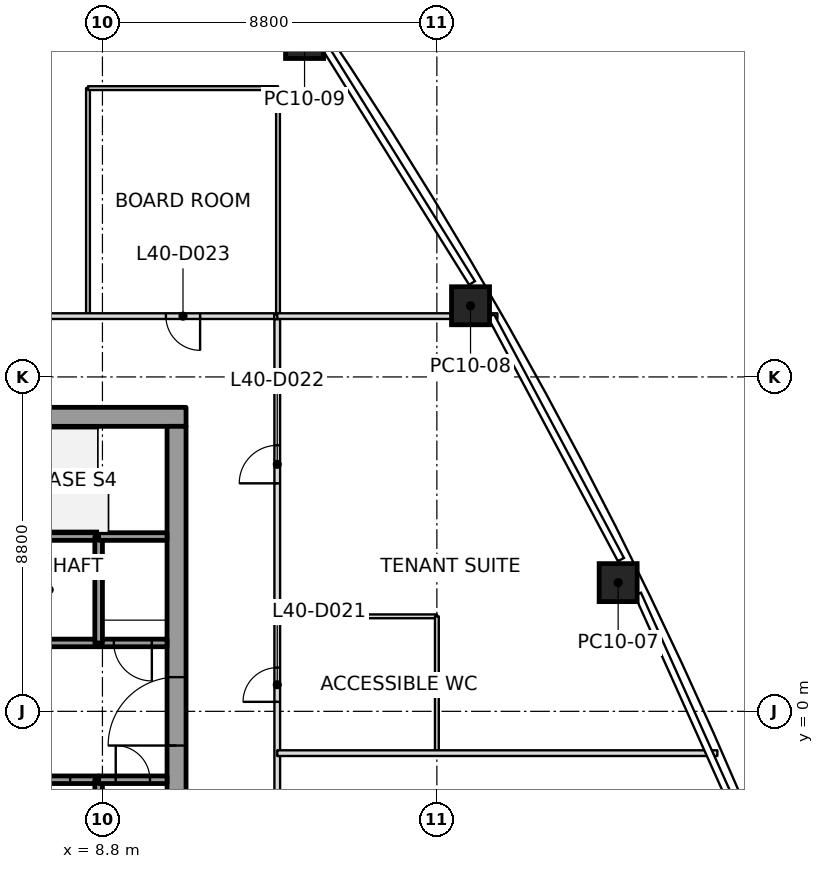
"""IFC4 building model, lengths in metres.
Left out: names, types, materials, properties, quantities, classifications, styles, units other than length and angle.
Written with IfcOpenShell. Run it as: python <this file> out.ifc"""

import sys

from ifc_helpers import new_model, si_unit, direction, frame, frame_2d, origin, origin_2d, place, context, subcontext, project, spatial, rectangle, extrude, element, fill, save


model = new_model("IFC4")
c1 = context("Model", 3, precision=1e-05, world=origin(), true_north=direction((0.0, 1.0)))
c2 = subcontext(c1, "Body", "Model", "MODEL_VIEW")
j1 = project(units=[si_unit("LENGTHUNIT", "METRE"), si_unit("PLANEANGLEUNIT", "RADIAN")], contexts=[c1])
p1 = place(None, origin())
s1 = spatial("IfcSite", under=j1, at=p1, CompositionType="ELEMENT")
p2 = place(p1, origin())
s2 = spatial("IfcBuilding", under=s1, at=p2, CompositionType="ELEMENT")
p3 = place(p2, frame((0.0, 0.0, 181.8)))
s3 = spatial("IfcBuildingStorey", under=s2, at=p3, CompositionType="ELEMENT", Elevation=181.8)
p4 = place(p3, frame((22.37, 3.387, 0.0), z_axis=(-0.014097691364, 0.002013955909, 0.999898594398), x_axis=(-0.440318544462, 0.897805834391, -0.008016429218)))
e1 = element("IfcColumn", 1, at=p4, inside=s3, PredefinedType="COLUMN", context=c2, shape_type="SweptSolid", body=[
    extrude(rectangle(XDim=1.0, YDim=1.0, at=origin_2d()), origin(), (0.0, 0.0, 1.0), 4.0),
])
p5 = place(p3, frame((18.486, 10.673, 0.0), z_axis=(-0.009887049298, -0.00573692984, 0.999934664812), x_axis=(-0.499975560967, 0.866039512843, 2.5126546e-05)))
e2 = element("IfcColumn", 2, at=p5, inside=s3, PredefinedType="COLUMN", context=c2, shape_type="SweptSolid", body=[
    extrude(rectangle(XDim=1.0, YDim=1.0, at=origin_2d()), origin(), (0.0, 0.0, 1.0), 4.0),
])
p6 = place(p3, frame((14.118, 17.68, 0.0), z_axis=(-0.005248490815, -0.013243284963, 0.999898529226), x_axis=(-0.55734623632, 0.83024095087, 0.00807070984)))
e3 = element("IfcColumn", 3, at=p6, inside=s3, PredefinedType="COLUMN", context=c2, shape_type="SweptSolid", body=[
    extrude(rectangle(XDim=1.0, YDim=1.0, at=origin_2d()), origin(), (0.0, 0.0, 1.0), 4.0),
])
p7 = place(p3, frame((-11.0, 7.75, 0.0), z_axis=(0.0, 0.0, 1.0), x_axis=(1.0, 0.0, 0.0)))
e4 = element("IfcWall", 4, at=p7, inside=s3, PredefinedType="SHEAR", context=c2, shape_type="SweptSolid", body=[
    extrude(rectangle(XDim=22.0, YDim=0.5, at=frame_2d((11.0, 0.0))), origin(), (0.0, 0.0, 1.0), 4.0),
])
p8 = place(p7, frame((10.45, 0.0, 0.0)))
e5 = element("IfcOpeningElement", 5, at=p8, cuts=e4, PredefinedType="OPENING", context=c2, shape_type="SweptSolid", body=[
    extrude(rectangle(XDim=1.1, YDim=2.1, at=frame_2d((0.55, 1.05))), frame((0.0, 0.25, 0.0), z_axis=(0.0, -1.0, 0.0), x_axis=(1.0, 0.0, 0.0)), (0.0, 0.0, 1.0), 0.5),
])
p9 = place(p3, frame((10.75, -7.5, 0.0), z_axis=(0.0, 0.0, 1.0), x_axis=(0.0, 1.0, 0.0)))
e6 = element("IfcWall", 6, at=p9, inside=s3, PredefinedType="SHEAR", context=c2, shape_type="SweptSolid", body=[
    extrude(rectangle(XDim=15.0, YDim=0.5, at=frame_2d((7.5, 0.0))), origin(), (0.0, 0.0, 1.0), 4.0),
])
p10 = place(p9, frame((6.6, 0.0, 0.0)))
e7 = element("IfcOpeningElement", 7, at=p10, cuts=e6, PredefinedType="OPENING", context=c2, shape_type="SweptSolid", body=[
    extrude(rectangle(XDim=1.8, YDim=2.1, at=frame_2d((0.9, 1.05))), frame((0.0, 0.25, 0.0), z_axis=(0.0, -1.0, 0.0), x_axis=(1.0, 0.0, 0.0)), (0.0, 0.0, 1.0), 0.5),
])
p11 = place(p3, frame((6.1, -1.8, 0.0), z_axis=(0.0, 0.0, 1.0), x_axis=(1.0, 0.0, 0.0)))
e8 = element("IfcWall", 8, at=p11, inside=s3, PredefinedType="SOLIDWALL", context=c2, shape_type="SweptSolid", body=[
    extrude(rectangle(XDim=2.6, YDim=0.2, at=frame_2d((1.3, 0.0))), origin(), (0.0, 0.0, 1.0), 3.85),
])
p12 = place(p11, frame((0.75, 0.0, 0.0)))
e9 = element("IfcOpeningElement", 9, at=p12, cuts=e8, PredefinedType="OPENING", context=c2, shape_type="SweptSolid", body=[
    extrude(rectangle(XDim=1.1, YDim=2.1, at=frame_2d((0.55, 1.05))), frame((0.0, 0.1, 0.0), z_axis=(0.0, -1.0, 0.0), x_axis=(1.0, 0.0, 0.0)), (0.0, 0.0, 1.0), 0.2),
])
for number, where, z_axis, x_axis in (
    (10, (8.7, 1.8, 0.0), (0.0, 0.0, 1.0), (-1.0, 0.0, 0.0)),
    (11, (8.7, 4.6, 0.0), (0.0, 0.0, 1.0), (-1.0, 0.0, 0.0)),
):
    element("IfcWall", number, at=place(p3, frame(where, z_axis=z_axis, x_axis=x_axis)), inside=s3, PredefinedType="SOLIDWALL", context=c2, shape_type="SweptSolid", body=[
        extrude(rectangle(XDim=2.6, YDim=0.2, at=frame_2d((1.3, 0.0))), origin(), (0.0, 0.0, 1.0), 3.85),
    ])
p13 = place(p3, frame((8.7, -1.8, 0.0), z_axis=(0.0, 0.0, 1.0), x_axis=(0.0, -1.0, 0.0)))
e12 = element("IfcWall", 12, at=p13, inside=s3, PredefinedType="SOLIDWALL", context=c2, shape_type="SweptSolid", body=[
    extrude(rectangle(XDim=2.8, YDim=0.2, at=frame_2d((1.4, 0.0))), origin(), (0.0, 0.0, 1.0), 3.85),
])
p14 = place(p3, frame((8.7, -1.8, 0.0), z_axis=(0.0, 0.0, 1.0), x_axis=(1.0, 0.0, 0.0)))
e13 = element("IfcWall", 13, at=p14, inside=s3, PredefinedType="SOLIDWALL", context=c2, shape_type="SweptSolid", body=[
    extrude(rectangle(XDim=1.8, YDim=0.2, at=frame_2d((0.9, 0.0))), origin(), (0.0, 0.0, 1.0), 3.85),
])
p15 = place(p14, frame((0.45, 0.0, 0.0)))
e14 = element("IfcOpeningElement", 14, at=p15, cuts=e13, PredefinedType="OPENING", context=c2, shape_type="SweptSolid", body=[
    extrude(rectangle(XDim=0.9, YDim=2.1, at=frame_2d((0.45, 1.05))), frame((0.0, 0.1, 0.0), z_axis=(0.0, -1.0, 0.0), x_axis=(1.0, 0.0, 0.0)), (0.0, 0.0, 1.0), 0.2),
])
p16 = place(p3, frame((10.5, 1.8, 0.0), z_axis=(0.0, 0.0, 1.0), x_axis=(-1.0, 0.0, 0.0)))
e15 = element("IfcWall", 15, at=p16, inside=s3, PredefinedType="SOLIDWALL", context=c2, shape_type="SweptSolid", body=[
    extrude(rectangle(XDim=1.8, YDim=0.2, at=frame_2d((0.9, 0.0))), origin(), (0.0, 0.0, 1.0), 3.85),
])
p17 = place(p16, frame((0.4, 0.0, 0.0)))
e16 = element("IfcOpeningElement", 16, at=p17, cuts=e15, PredefinedType="OPENING", context=c2, shape_type="SweptSolid", body=[
    extrude(rectangle(XDim=1.0, YDim=2.1, at=frame_2d((0.5, 1.05))), frame((0.0, 0.1, 0.0), z_axis=(0.0, -1.0, 0.0), x_axis=(1.0, 0.0, 0.0)), (0.0, 0.0, 1.0), 0.2),
])
p18 = place(p3, frame((8.7, 4.6, 0.0), z_axis=(0.0, 0.0, 1.0), x_axis=(0.0, -1.0, 0.0)))
e17 = element("IfcWall", 17, at=p18, inside=s3, PredefinedType="SOLIDWALL", context=c2, shape_type="SweptSolid", body=[
    extrude(rectangle(XDim=2.8, YDim=0.2, at=frame_2d((1.4, 0.0))), origin(), (0.0, 0.0, 1.0), 3.85),
])
p19 = place(p3, frame((10.5, 4.6, 0.0), z_axis=(0.0, 0.0, 1.0), x_axis=(-1.0, 0.0, 0.0)))
e18 = element("IfcWall", 18, at=p19, inside=s3, PredefinedType="SOLIDWALL", context=c2, shape_type="SweptSolid", body=[
    extrude(rectangle(XDim=1.8, YDim=0.2, at=frame_2d((0.9, 0.0))), origin(), (0.0, 0.0, 1.0), 3.85),
])
p20 = place(p3, frame((24.98, -1.1, 0.0), z_axis=(0.0, 0.0, 1.0), x_axis=(-1.0, 0.0, 0.0)))
e19 = element("IfcWall", 19, at=p20, inside=s3, PredefinedType="PARTITIONING", context=c2, shape_type="SweptSolid", body=[
    extrude(rectangle(XDim=11.58, YDim=0.15, at=frame_2d((5.79, 0.0))), origin(), (0.0, 0.0, 1.0), 3.234),
])
p21 = place(p3, frame((13.4, 10.4, 0.0), z_axis=(0.0, 0.0, 1.0), x_axis=(1.0, 0.0, 0.0)))
e20 = element("IfcWall", 20, at=p21, inside=s3, PredefinedType="PARTITIONING", context=c2, shape_type="SweptSolid", body=[
    extrude(rectangle(XDim=5.793, YDim=0.15, at=frame_2d((2.896, 0.0))), origin(), (0.0, 0.0, 1.0), 3.45),
])
p22 = place(p3, frame((13.32, 10.4, 0.0), z_axis=(0.0, 0.0, 1.0), x_axis=(-1.0, 0.0, 0.0)))
e21 = element("IfcWall", 21, at=p22, inside=s3, PredefinedType="PARTITIONING", context=c2, shape_type="SweptSolid", body=[
    extrude(rectangle(XDim=26.64, YDim=0.15, at=frame_2d((13.32, 0.0))), origin(), (0.0, 0.0, 1.0), 3.166),
])
p23 = place(p22, frame((1.95, 0.0, 0.0)))
e22 = element("IfcOpeningElement", 22, at=p23, cuts=e21, PredefinedType="OPENING", context=c2, shape_type="SweptSolid", body=[
    extrude(rectangle(XDim=0.9, YDim=2.1, at=frame_2d((0.45, 1.05))), frame((0.0, 0.075, 0.0), z_axis=(0.0, -1.0, 0.0), x_axis=(1.0, 0.0, 0.0)), (0.0, 0.0, 1.0), 0.15),
])
p24 = place(p22, frame((9.61, 0.0, 0.0)))
e23 = element("IfcOpeningElement", 23, at=p24, cuts=e21, PredefinedType="OPENING", context=c2, shape_type="SweptSolid", body=[
    extrude(rectangle(XDim=1.0, YDim=2.1, at=frame_2d((0.5, 1.05))), frame((0.0, 0.075, 0.0), z_axis=(0.0, -1.0, 0.0), x_axis=(1.0, 0.0, 0.0)), (0.0, 0.0, 1.0), 0.15),
])
p25 = place(p22, frame((16.87, 0.0, 0.0)))
e24 = element("IfcOpeningElement", 24, at=p25, cuts=e21, PredefinedType="OPENING", context=c2, shape_type="SweptSolid", body=[
    extrude(rectangle(XDim=0.9, YDim=2.1, at=frame_2d((0.45, 1.05))), frame((0.0, 0.075, 0.0), z_axis=(0.0, -1.0, 0.0), x_axis=(1.0, 0.0, 0.0)), (0.0, 0.0, 1.0), 0.15),
])
p26 = place(p22, frame((22.63, 0.0, 0.0)))
e25 = element("IfcOpeningElement", 25, at=p26, cuts=e21, PredefinedType="OPENING", context=c2, shape_type="SweptSolid", body=[
    extrude(rectangle(XDim=1.0, YDim=2.1, at=frame_2d((0.5, 1.05))), frame((0.0, 0.075, 0.0), z_axis=(0.0, -1.0, 0.0), x_axis=(1.0, 0.0, 0.0)), (0.0, 0.0, 1.0), 0.15),
])
p27 = place(p3, frame((13.4, -10.32, 0.0), z_axis=(0.0, 0.0, 1.0), x_axis=(0.0, 1.0, 0.0)))
e26 = element("IfcWall", 26, at=p27, inside=s3, PredefinedType="PARTITIONING", context=c2, shape_type="SweptSolid", body=[
    extrude(rectangle(XDim=20.64, YDim=0.15, at=frame_2d((10.32, 0.0))), origin(), (0.0, 0.0, 1.0), 3.166),
])
p28 = place(p27, frame((10.57, 0.0, 0.0)))
e27 = element("IfcOpeningElement", 27, at=p28, cuts=e26, PredefinedType="OPENING", context=c2, shape_type="SweptSolid", body=[
    extrude(rectangle(XDim=0.9, YDim=2.1, at=frame_2d((0.45, 1.05))), frame((0.0, 0.075, 0.0), z_axis=(0.0, -1.0, 0.0), x_axis=(1.0, 0.0, 0.0)), (0.0, 0.0, 1.0), 0.15),
])
p29 = place(p27, frame((16.32, 0.0, 0.0)))
e28 = element("IfcOpeningElement", 28, at=p29, cuts=e26, PredefinedType="OPENING", context=c2, shape_type="SweptSolid", body=[
    extrude(rectangle(XDim=1.0, YDim=2.1, at=frame_2d((0.5, 1.05))), frame((0.0, 0.075, 0.0), z_axis=(0.0, -1.0, 0.0), x_axis=(1.0, 0.0, 0.0)), (0.0, 0.0, 1.0), 0.15),
])
p30 = place(p27, frame((1.55, 0.0, 0.0)))
e29 = element("IfcOpeningElement", 29, at=p30, cuts=e26, PredefinedType="OPENING", context=c2, shape_type="SweptSolid", body=[
    extrude(rectangle(XDim=0.9, YDim=2.1, at=frame_2d((0.45, 1.05))), frame((0.0, 0.075, 0.0), z_axis=(0.0, -1.0, 0.0), x_axis=(1.0, 0.0, 0.0)), (0.0, 0.0, 1.0), 0.15),
])
p31 = place(p27, frame((6.21, 0.0, 0.0)))
e30 = element("IfcOpeningElement", 30, at=p31, cuts=e26, PredefinedType="OPENING", context=c2, shape_type="SweptSolid", body=[
    extrude(rectangle(XDim=1.0, YDim=2.1, at=frame_2d((0.5, 1.05))), frame((0.0, 0.075, 0.0), z_axis=(0.0, -1.0, 0.0), x_axis=(1.0, 0.0, 0.0)), (0.0, 0.0, 1.0), 0.15),
])
p32 = place(p3, frame((8.42, 10.43, 0.0), z_axis=(0.0, 0.0, 1.0), x_axis=(0.0, 1.0, 0.0)))
e31 = element("IfcWall", 31, at=p32, inside=s3, PredefinedType="PARTITIONING", context=c2, shape_type="SweptSolid", body=[
    extrude(rectangle(XDim=5.97, YDim=0.1, at=frame_2d((2.985, 0.0))), origin(), (0.0, 0.0, 1.0), 3.247),
])
p33 = place(p3, frame((8.42, 16.4, 0.0), z_axis=(0.0, 0.0, 1.0), x_axis=(1.0, 0.0, 0.0)))
e32 = element("IfcWall", 32, at=p33, inside=s3, PredefinedType="PARTITIONING", context=c2, shape_type="SweptSolid", body=[
    extrude(rectangle(XDim=5.0, YDim=0.1, at=frame_2d((2.5, 0.0))), origin(), (0.0, 0.0, 1.0), 3.247),
])
p34 = place(p3, frame((13.42, 16.4, 0.0), z_axis=(0.0, 0.0, 1.0), x_axis=(0.0, -1.0, 0.0)))
e33 = element("IfcWall", 33, at=p34, inside=s3, PredefinedType="PARTITIONING", context=c2, shape_type="SweptSolid", body=[
    extrude(rectangle(XDim=5.97, YDim=0.1, at=frame_2d((2.985, 0.0))), origin(), (0.0, 0.0, 1.0), 3.247),
])
p35 = place(p3, frame((13.43, 2.5, 0.0), z_axis=(0.0, 0.0, 1.0), x_axis=(1.0, 0.0, 0.0)))
e34 = element("IfcWall", 34, at=p35, inside=s3, PredefinedType="PARTITIONING", context=c2, shape_type="SweptSolid", body=[
    extrude(rectangle(XDim=4.17, YDim=0.1, at=frame_2d((2.085, 0.0))), origin(), (0.0, 0.0, 1.0), 3.393),
])
p36 = place(p3, frame((17.6, 2.5, 0.0), z_axis=(0.0, 0.0, 1.0), x_axis=(0.0, -1.0, 0.0)))
e35 = element("IfcWall", 35, at=p36, inside=s3, PredefinedType="PARTITIONING", context=c2, shape_type="SweptSolid", body=[
    extrude(rectangle(XDim=3.57, YDim=0.1, at=frame_2d((1.785, 0.0))), origin(), (0.0, 0.0, 1.0), 3.317),
])
p37 = place(p28, origin())
e36 = element("IfcDoor", 36, at=p37, inside=s3, OperationType="SINGLE_SWING_RIGHT", PredefinedType="DOOR", context=c2, shape_type="SweptSolid", body=[
    extrude(rectangle(XDim=0.9, YDim=2.1, at=frame_2d((0.45, 1.05))), frame((0.0, 0.025, 0.0), z_axis=(0.0, -1.0, 0.0), x_axis=(1.0, 0.0, 0.0)), (0.0, 0.0, 1.0), 0.05),
])
fill(e27, e36)
p38 = place(p29, origin())
e37 = element("IfcDoor", 37, at=p38, inside=s3, OperationType="SINGLE_SWING_LEFT", PredefinedType="DOOR", context=c2, shape_type="SweptSolid", body=[
    extrude(rectangle(XDim=1.0, YDim=2.1, at=frame_2d((0.5, 1.05))), frame((0.0, 0.025, 0.0), z_axis=(0.0, -1.0, 0.0), x_axis=(1.0, 0.0, 0.0)), (0.0, 0.0, 1.0), 0.05),
])
fill(e28, e37)
p39 = place(p23, origin())
e38 = element("IfcDoor", 38, at=p39, inside=s3, OperationType="SINGLE_SWING_RIGHT", PredefinedType="DOOR", context=c2, shape_type="SweptSolid", body=[
    extrude(rectangle(XDim=0.9, YDim=2.1, at=frame_2d((0.45, 1.05))), frame((0.0, 0.025, 0.0), z_axis=(0.0, -1.0, 0.0), x_axis=(1.0, 0.0, 0.0)), (0.0, 0.0, 1.0), 0.05),
])
fill(e22, e38)
p40 = place(p12, origin())
e39 = element("IfcDoor", 39, at=p40, inside=s3, OperationType="SLIDING_TO_LEFT", PredefinedType="DOOR", context=c2, shape_type="SweptSolid", body=[
    extrude(rectangle(XDim=1.1, YDim=2.1, at=frame_2d((0.55, 1.05))), frame((0.0, 0.025, 0.0), z_axis=(0.0, -1.0, 0.0), x_axis=(1.0, 0.0, 0.0)), (0.0, 0.0, 1.0), 0.05),
])
fill(e9, e39)
p41 = place(p17, origin())
e40 = element("IfcDoor", 40, at=p41, inside=s3, OperationType="SINGLE_SWING_LEFT", PredefinedType="DOOR", context=c2, shape_type="SweptSolid", body=[
    extrude(rectangle(XDim=1.0, YDim=2.1, at=frame_2d((0.5, 1.05))), frame((0.0, 0.025, 0.0), z_axis=(0.0, -1.0, 0.0), x_axis=(1.0, 0.0, 0.0)), (0.0, 0.0, 1.0), 0.05),
])
fill(e16, e40)
p42 = place(p15, origin())
e41 = element("IfcDoor", 41, at=p42, inside=s3, OperationType="SINGLE_SWING_LEFT", PredefinedType="DOOR", context=c2, shape_type="SweptSolid", body=[
    extrude(rectangle(XDim=0.9, YDim=2.1, at=frame_2d((0.45, 1.05))), frame((0.0, 0.025, 0.0), z_axis=(0.0, -1.0, 0.0), x_axis=(1.0, 0.0, 0.0)), (0.0, 0.0, 1.0), 0.05),
])
fill(e14, e41)
p43 = place(p10, origin())
e42 = element("IfcDoor", 42, at=p43, inside=s3, OperationType="DOUBLE_DOOR_SINGLE_SWING", PredefinedType="DOOR", context=c2, shape_type="SweptSolid", body=[
    extrude(rectangle(XDim=1.8, YDim=2.1, at=frame_2d((0.9, 1.05))), frame((0.0, 0.025, 0.0), z_axis=(0.0, -1.0, 0.0), x_axis=(1.0, 0.0, 0.0)), (0.0, 0.0, 1.0), 0.05),
])
fill(e7, e42)
save(model, sys.argv[1])
